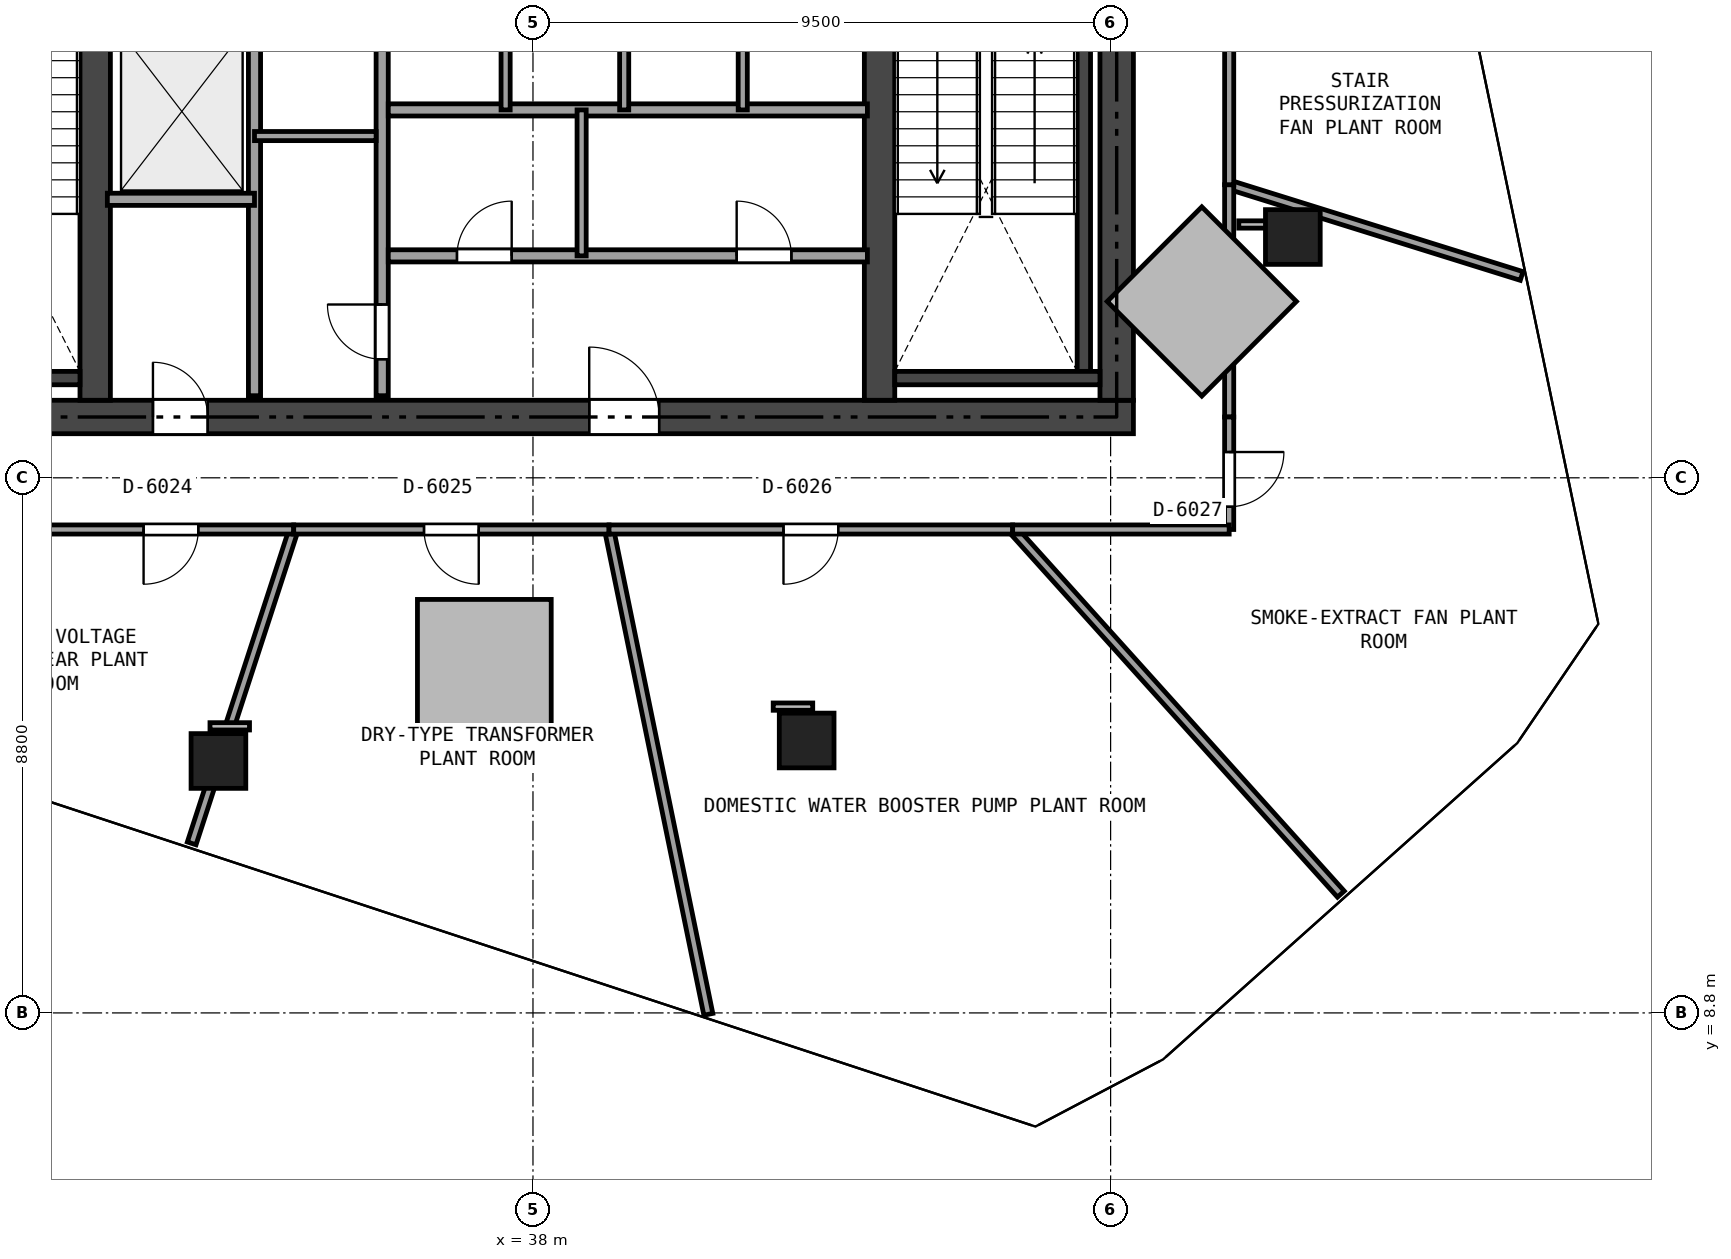
"""IFC4 building model, lengths in metres.
Left out: names, types, materials, properties, quantities, classifications, styles, units other than length and angle.
Written with IfcOpenShell. Run it as: python <this file> out.ifc"""

import sys

from ifc_helpers import new_model, si_unit, direction, frame, frame_2d, origin, origin_2d, place, context, subcontext, project, spatial, rectangle, extrude, element, fill, save


model = new_model("IFC4")
c1 = context("Model", 3, precision=1e-05, world=origin(), true_north=direction((0.0, 1.0)))
c2 = subcontext(c1, "Body", "Model", "MODEL_VIEW")
j1 = project(units=[si_unit("LENGTHUNIT", "METRE"), si_unit("PLANEANGLEUNIT", "RADIAN")], contexts=[c1])
p1 = place(None, origin())
s1 = spatial("IfcSite", under=j1, at=p1, CompositionType="ELEMENT")
p2 = place(p1, origin())
s2 = spatial("IfcBuilding", under=s1, at=p2, CompositionType="ELEMENT")
p3 = place(p2, frame((0.0, 0.0, 223.8)))
s3 = spatial("IfcBuildingStorey", under=s2, at=p3, CompositionType="ELEMENT", Elevation=223.8)
p4 = place(p3, frame((26.525, 18.6, 0.0), z_axis=(0.0, 0.0, 1.0), x_axis=(1.0, 0.0, 0.0)))
e1 = element("IfcWall", 1, at=p4, inside=s3, PredefinedType="SHEAR", context=c2, shape_type="SweptSolid", body=[
    extrude(rectangle(XDim=21.35, YDim=0.55, at=frame_2d((10.675, 0.0))), origin(), (0.0, 0.0, 1.0), 4.14),
])
p5 = place(p4, frame((12.4, 0.0, 0.0)))
e2 = element("IfcOpeningElement", 2, at=p5, cuts=e1, PredefinedType="OPENING", context=c2, shape_type="SweptSolid", body=[
    extrude(rectangle(XDim=1.15, YDim=2.15, at=frame_2d((0.575, 1.075))), frame((0.0, 0.285, 0.0), z_axis=(0.0, -1.0, 0.0), x_axis=(1.0, 0.0, 0.0)), (0.0, 0.0, 1.0), 0.57),
])
p6 = place(p4, frame((5.225, 0.0, 0.0)))
e3 = element("IfcOpeningElement", 3, at=p6, cuts=e1, PredefinedType="OPENING", context=c2, shape_type="SweptSolid", body=[
    extrude(rectangle(XDim=0.9, YDim=2.1, at=frame_2d((0.45, 1.05))), frame((0.0, 0.285, 0.0), z_axis=(0.0, -1.0, 0.0), x_axis=(1.0, 0.0, 0.0)), (0.0, 0.0, 1.0), 0.57),
])
p7 = place(p3, frame((47.6, 18.875, 0.0), z_axis=(0.0, 0.0, 1.0), x_axis=(0.0, 1.0, 0.0)))
e4 = element("IfcWall", 4, at=p7, inside=s3, PredefinedType="SHEAR", context=c2, shape_type="SweptSolid", body=[
    extrude(rectangle(XDim=15.05, YDim=0.55, at=frame_2d((7.525, 0.0))), origin(), (0.0, 0.0, 1.0), 4.14),
])
p8 = place(p7, frame((6.625, 0.0, 0.0)))
e5 = element("IfcOpeningElement", 5, at=p8, cuts=e4, PredefinedType="OPENING", context=c2, shape_type="SweptSolid", body=[
    extrude(rectangle(XDim=1.1, YDim=2.15, at=frame_2d((0.55, 1.075))), frame((0.0, 0.285, 0.0), z_axis=(0.0, -1.0, 0.0), x_axis=(1.0, 0.0, 0.0)), (0.0, 0.0, 1.0), 0.57),
])
p9 = place(p7, frame((8.525, 0.0, 0.0)))
e6 = element("IfcOpeningElement", 6, at=p9, cuts=e4, PredefinedType="OPENING", context=c2, shape_type="SweptSolid", body=[
    extrude(rectangle(XDim=0.9, YDim=2.1, at=frame_2d((0.45, 1.05))), frame((0.0, 0.285, 0.0), z_axis=(0.0, -1.0, 0.0), x_axis=(1.0, 0.0, 0.0)), (0.0, 0.0, 1.0), 0.57),
])
p10 = place(p7, frame((13.175, 0.0, 0.0)))
e7 = element("IfcOpeningElement", 7, at=p10, cuts=e4, PredefinedType="OPENING", context=c2, shape_type="SweptSolid", body=[
    extrude(rectangle(XDim=0.9, YDim=2.1, at=frame_2d((0.45, 1.05))), frame((0.0, 0.285, 0.0), z_axis=(0.0, -1.0, 0.0), x_axis=(1.0, 0.0, 0.0)), (0.0, 0.0, 1.0), 0.57),
])
p11 = place(p3, frame((30.8, 18.875, 0.0), z_axis=(0.0, 0.0, 1.0), x_axis=(0.0, 1.0, 0.0)))
e8 = element("IfcWall", 8, at=p11, inside=s3, PredefinedType="SHEAR", context=c2, shape_type="SweptSolid", body=[
    extrude(rectangle(XDim=15.05, YDim=0.5, at=frame_2d((7.525, 0.0))), origin(), (0.0, 0.0, 1.0), 4.14),
])
p12 = place(p11, frame((6.625, 0.0, 0.0)))
e9 = element("IfcOpeningElement", 9, at=p12, cuts=e8, PredefinedType="OPENING", context=c2, shape_type="SweptSolid", body=[
    extrude(rectangle(XDim=1.1, YDim=2.15, at=frame_2d((0.55, 1.075))), frame((0.0, 0.26, 0.0), z_axis=(0.0, -1.0, 0.0), x_axis=(1.0, 0.0, 0.0)), (0.0, 0.0, 1.0), 0.52),
])
p13 = place(p11, frame((8.425, 0.0, 0.0)))
e10 = element("IfcOpeningElement", 10, at=p13, cuts=e8, PredefinedType="OPENING", context=c2, shape_type="SweptSolid", body=[
    extrude(rectangle(XDim=0.9, YDim=2.1, at=frame_2d((0.45, 1.05))), frame((0.0, 0.26, 0.0), z_axis=(0.0, -1.0, 0.0), x_axis=(1.0, 0.0, 0.0)), (0.0, 0.0, 1.0), 0.52),
])
p14 = place(p3, frame((43.7, 18.875, 0.0), z_axis=(0.0, 0.0, 1.0), x_axis=(0.0, 1.0, 0.0)))
e11 = element("IfcWall", 11, at=p14, inside=s3, PredefinedType="SHEAR", context=c2, shape_type="SweptSolid", body=[
    extrude(rectangle(XDim=15.05, YDim=0.5, at=frame_2d((7.525, 0.0))), origin(), (0.0, 0.0, 1.0), 4.14),
])
p15 = place(p14, frame((8.125, 0.0, 0.0)))
e12 = element("IfcOpeningElement", 12, at=p15, cuts=e11, PredefinedType="OPENING", context=c2, shape_type="SweptSolid", body=[
    extrude(rectangle(XDim=0.9, YDim=2.1, at=frame_2d((0.45, 1.05))), frame((0.0, 0.26, 0.0), z_axis=(0.0, -1.0, 0.0), x_axis=(1.0, 0.0, 0.0)), (0.0, 0.0, 1.0), 0.52),
])
p16 = place(p3, frame((27.075, 19.24, 0.0), z_axis=(0.0, 0.0, 1.0), x_axis=(1.0, 0.0, 0.0)))
e13 = element("IfcWall", 13, at=p16, inside=s3, PredefinedType="SHEAR", context=c2, shape_type="SweptSolid", body=[
    extrude(rectangle(XDim=3.475, YDim=0.22, at=frame_2d((1.738, 0.0))), origin(), (0.0, 0.0, 1.0), 4.14),
])
p17 = place(p3, frame((47.06, 19.35, 0.0), z_axis=(0.0, 0.0, 1.0), x_axis=(0.0, 1.0, 0.0)))
e14 = element("IfcWall", 14, at=p17, inside=s3, PredefinedType="SHEAR", context=c2, shape_type="SweptSolid", body=[
    extrude(rectangle(XDim=5.9, YDim=0.22, at=frame_2d((2.95, 0.0))), origin(), (0.0, 0.0, 1.0), 4.14),
])
p18 = place(p3, frame((43.95, 19.24, 0.0), z_axis=(0.0, 0.0, 1.0), x_axis=(1.0, 0.0, 0.0)))
e15 = element("IfcWall", 15, at=p18, inside=s3, PredefinedType="SHEAR", context=c2, shape_type="SweptSolid", body=[
    extrude(rectangle(XDim=3.375, YDim=0.22, at=frame_2d((1.688, 0.0))), origin(), (0.0, 0.0, 1.0), 4.14),
])
for number, where, z_axis, x_axis in (
    (16, (32.827, 12.943, 0.0), (0.0, 0.0, 1.0), (1.0, 0.0, 0.0)),
    (17, (42.501, 13.28, 0.0), (0.0, 0.0, 1.0), (1.0, 0.0, 0.0)),
    (18, (50.497, 21.56, 0.0), (0.0, 0.0, 1.0), (1.0, 0.0, 0.0)),
):
    element("IfcColumn", number, at=place(p3, frame(where, z_axis=z_axis, x_axis=x_axis)), inside=s3, PredefinedType="COLUMN", context=c2, shape_type="SweptSolid", body=[
        extrude(rectangle(XDim=0.9, YDim=0.9, at=origin_2d()), origin(), (0.0, 0.0, 1.0), 4.14),
    ])
p19 = place(p3, frame((35.52, 18.95, 0.0), z_axis=(0.0, 0.0, 1.0), x_axis=(0.0, 1.0, 0.0)))
e19 = element("IfcWall", 19, at=p19, inside=s3, PredefinedType="SOLIDWALL", context=c2, shape_type="SweptSolid", body=[
    extrude(rectangle(XDim=14.9, YDim=0.2, at=frame_2d((7.45, 0.0))), origin(), (0.0, 0.0, 1.0), 3.661),
])
p20 = place(p19, frame((7.755, 0.0, 0.0)))
e20 = element("IfcOpeningElement", 20, at=p20, cuts=e19, PredefinedType="OPENING", context=c2, shape_type="SweptSolid", body=[
    extrude(rectangle(XDim=0.95, YDim=2.15, at=frame_2d((0.475, 1.075))), frame((0.0, 0.11, 0.0), z_axis=(0.0, -1.0, 0.0), x_axis=(1.0, 0.0, 0.0)), (0.0, 0.0, 1.0), 0.22),
])
p21 = place(p19, frame((0.6, 0.0, 0.0)))
e21 = element("IfcOpeningElement", 21, at=p21, cuts=e19, PredefinedType="OPENING", context=c2, shape_type="SweptSolid", body=[
    extrude(rectangle(XDim=0.9, YDim=2.1, at=frame_2d((0.45, 1.05))), frame((0.0, 0.11, 0.0), z_axis=(0.0, -1.0, 0.0), x_axis=(1.0, 0.0, 0.0)), (0.0, 0.0, 1.0), 0.22),
])
p22 = place(p3, frame((33.42, 18.95, 0.0), z_axis=(0.0, 0.0, 1.0), x_axis=(0.0, 1.0, 0.0)))
e22 = element("IfcWall", 22, at=p22, inside=s3, PredefinedType="SOLIDWALL", context=c2, shape_type="SweptSolid", body=[
    extrude(rectangle(XDim=6.13, YDim=0.2, at=frame_2d((3.065, 0.0))), origin(), (0.0, 0.0, 1.0), 3.661),
])
p23 = place(p3, frame((31.0, 22.18, 0.0), z_axis=(0.0, 0.0, 1.0), x_axis=(1.0, 0.0, 0.0)))
e23 = element("IfcWall", 23, at=p23, inside=s3, PredefinedType="SOLIDWALL", context=c2, shape_type="SweptSolid", body=[
    extrude(rectangle(XDim=2.42, YDim=0.2, at=frame_2d((1.21, 0.0))), origin(), (0.0, 0.0, 1.0), 4.14),
])
p24 = place(p3, frame((33.42, 23.22, 0.0), z_axis=(0.0, 0.0, 1.0), x_axis=(1.0, 0.0, 0.0)))
e24 = element("IfcWall", 24, at=p24, inside=s3, PredefinedType="PARTITIONING", context=c2, shape_type="SweptSolid", body=[
    extrude(rectangle(XDim=2.0, YDim=0.15, at=frame_2d((1.0, 0.0))), origin(), (0.0, 0.0, 1.0), 4.14),
])
p25 = place(p3, frame((35.62, 23.65, 0.0), z_axis=(0.0, 0.0, 1.0), x_axis=(1.0, 0.0, 0.0)))
e25 = element("IfcWall", 25, at=p25, inside=s3, PredefinedType="SOLIDWALL", context=c2, shape_type="SweptSolid", body=[
    extrude(rectangle(XDim=7.88, YDim=0.2, at=frame_2d((3.94, 0.0))), origin(), (0.0, 0.0, 1.0), 3.661),
])
p26 = place(p3, frame((35.62, 21.25, 0.0), z_axis=(0.0, 0.0, 1.0), x_axis=(1.0, 0.0, 0.0)))
e26 = element("IfcWall", 26, at=p26, inside=s3, PredefinedType="SOLIDWALL", context=c2, shape_type="SweptSolid", body=[
    extrude(rectangle(XDim=7.88, YDim=0.2, at=frame_2d((3.94, 0.0))), origin(), (0.0, 0.0, 1.0), 4.14),
])
p27 = place(p26, frame((1.13, 0.0, 0.0)))
e27 = element("IfcOpeningElement", 27, at=p27, cuts=e26, PredefinedType="OPENING", context=c2, shape_type="SweptSolid", body=[
    extrude(rectangle(XDim=0.9, YDim=2.1, at=frame_2d((0.45, 1.05))), frame((0.0, 0.11, 0.0), z_axis=(0.0, -1.0, 0.0), x_axis=(1.0, 0.0, 0.0)), (0.0, 0.0, 1.0), 0.22),
])
p28 = place(p26, frame((5.73, 0.0, 0.0)))
e28 = element("IfcOpeningElement", 28, at=p28, cuts=e26, PredefinedType="OPENING", context=c2, shape_type="SweptSolid", body=[
    extrude(rectangle(XDim=0.9, YDim=2.1, at=frame_2d((0.45, 1.05))), frame((0.0, 0.11, 0.0), z_axis=(0.0, -1.0, 0.0), x_axis=(1.0, 0.0, 0.0)), (0.0, 0.0, 1.0), 0.22),
])
for number, where, z_axis, x_axis in (
    (29, (37.55, 23.65, 0.0), (0.0, 0.0, 1.0), (0.0, 1.0, 0.0)),
    (30, (39.5, 23.65, 0.0), (0.0, 0.0, 1.0), (0.0, 1.0, 0.0)),
    (31, (41.45, 23.65, 0.0), (0.0, 0.0, 1.0), (0.0, 1.0, 0.0)),
):
    element("IfcWall", number, at=place(p3, frame(where, z_axis=z_axis, x_axis=x_axis)), inside=s3, PredefinedType="PARTITIONING", context=c2, shape_type="SweptSolid", body=[
        extrude(rectangle(XDim=2.55, YDim=0.15, at=frame_2d((1.275, 0.0))), origin(), (0.0, 0.0, 1.0), 3.661),
    ])
p29 = place(p3, frame((38.8, 21.25, 0.0), z_axis=(0.0, 0.0, 1.0), x_axis=(0.0, 1.0, 0.0)))
e32 = element("IfcWall", 32, at=p29, inside=s3, PredefinedType="PARTITIONING", context=c2, shape_type="SweptSolid", body=[
    extrude(rectangle(XDim=2.4, YDim=0.15, at=frame_2d((1.2, 0.0))), origin(), (0.0, 0.0, 1.0), 3.661),
])
p30 = place(p3, frame((32.387, 11.588, 0.0), z_axis=(0.0, 0.0, 1.0), x_axis=(0.309134889379, 0.951018201807, 0.0)))
e33 = element("IfcWall", 33, at=p30, inside=s3, PredefinedType="PARTITIONING", context=c2, shape_type="SweptSolid", body=[
    extrude(rectangle(XDim=5.428, YDim=0.15, at=frame_2d((2.714, 0.0))), origin(), (0.0, 0.0, 1.0), 3.125),
])
p31 = place(p3, frame((34.065, 16.75, 0.0), z_axis=(0.0, 0.0, 1.0), x_axis=(-1.0, 0.0, 0.0)))
e34 = element("IfcWall", 34, at=p31, inside=s3, PredefinedType="PARTITIONING", context=c2, shape_type="SweptSolid", body=[
    extrude(rectangle(XDim=7.582, YDim=0.15, at=frame_2d((3.791, 0.0))), origin(), (0.0, 0.0, 1.0), 3.125),
])
p32 = place(p31, frame((1.569, 0.0, 0.0)))
e35 = element("IfcOpeningElement", 35, at=p32, cuts=e34, PredefinedType="OPENING", context=c2, shape_type="SweptSolid", body=[
    extrude(rectangle(XDim=0.9, YDim=2.0, at=frame_2d((0.45, 1.0))), frame((0.0, 0.085, 0.0), z_axis=(0.0, -1.0, 0.0), x_axis=(1.0, 0.0, 0.0)), (0.0, 0.0, 1.0), 0.17),
])
p33 = place(p3, frame((40.884, 8.777, 0.0), z_axis=(0.0, 0.0, 1.0), x_axis=(-0.20065995391, 0.979660953033, 0.0)))
e36 = element("IfcWall", 36, at=p33, inside=s3, PredefinedType="PARTITIONING", context=c2, shape_type="SweptSolid", body=[
    extrude(rectangle(XDim=8.138, YDim=0.15, at=frame_2d((4.069, 0.0))), origin(), (0.0, 0.0, 1.0), 3.725),
])
p34 = place(p3, frame((39.251, 16.75, 0.0), z_axis=(0.0, 0.0, 1.0), x_axis=(-1.0, 0.0, 0.0)))
e37 = element("IfcWall", 37, at=p34, inside=s3, PredefinedType="PARTITIONING", context=c2, shape_type="SweptSolid", body=[
    extrude(rectangle(XDim=5.186, YDim=0.15, at=frame_2d((2.593, 0.0))), origin(), (0.0, 0.0, 1.0), 3.125),
])
p35 = place(p34, frame((2.143, 0.0, 0.0)))
e38 = element("IfcOpeningElement", 38, at=p35, cuts=e37, PredefinedType="OPENING", context=c2, shape_type="SweptSolid", body=[
    extrude(rectangle(XDim=0.9, YDim=2.0, at=frame_2d((0.45, 1.0))), frame((0.0, 0.085, 0.0), z_axis=(0.0, -1.0, 0.0), x_axis=(1.0, 0.0, 0.0)), (0.0, 0.0, 1.0), 0.17),
])
p36 = place(p3, frame((51.287, 10.754, 0.0), z_axis=(0.0, 0.0, 1.0), x_axis=(-0.669081751461, 0.743188811717, 0.0)))
e39 = element("IfcWall", 39, at=p36, inside=s3, PredefinedType="PARTITIONING", context=c2, shape_type="SweptSolid", body=[
    extrude(rectangle(XDim=8.068, YDim=0.15, at=frame_2d((4.034, 0.0))), origin(), (0.0, 0.0, 1.0), 3.725),
])
p37 = place(p3, frame((45.889, 16.75, 0.0), z_axis=(0.0, 0.0, 1.0), x_axis=(-1.0, 0.0, 0.0)))
e40 = element("IfcWall", 40, at=p37, inside=s3, PredefinedType="PARTITIONING", context=c2, shape_type="SweptSolid", body=[
    extrude(rectangle(XDim=6.638, YDim=0.15, at=frame_2d((3.319, 0.0))), origin(), (0.0, 0.0, 1.0), 3.125),
])
p38 = place(p37, frame((2.869, 0.0, 0.0)))
e41 = element("IfcOpeningElement", 41, at=p38, cuts=e40, PredefinedType="OPENING", context=c2, shape_type="SweptSolid", body=[
    extrude(rectangle(XDim=0.9, YDim=2.0, at=frame_2d((0.45, 1.0))), frame((0.0, 0.085, 0.0), z_axis=(0.0, -1.0, 0.0), x_axis=(1.0, 0.0, 0.0)), (0.0, 0.0, 1.0), 0.17),
])
p39 = place(p3, frame((54.26, 20.919, 0.0), z_axis=(0.0, 0.0, 1.0), x_axis=(-0.954602320973, 0.297883213346, 0.0)))
e42 = element("IfcWall", 42, at=p39, inside=s3, PredefinedType="PARTITIONING", context=c2, shape_type="SweptSolid", body=[
    extrude(rectangle(XDim=5.039, YDim=0.15, at=frame_2d((2.52, 0.0))), origin(), (0.0, 0.0, 1.0), 3.725),
])
p40 = place(p3, frame((49.45, 22.42, 0.0), z_axis=(0.0, 0.0, 1.0), x_axis=(0.0, -1.0, 0.0)))
e43 = element("IfcWall", 43, at=p40, inside=s3, PredefinedType="PARTITIONING", context=c2, shape_type="SweptSolid", body=[
    extrude(rectangle(XDim=3.82, YDim=0.15, at=frame_2d((1.91, 0.0))), origin(), (0.0, 0.0, 1.0), 3.125),
])
p41 = place(p3, frame((49.45, 18.6, 0.0), z_axis=(0.0, 0.0, 1.0), x_axis=(0.0, -1.0, 0.0)))
e44 = element("IfcWall", 44, at=p41, inside=s3, PredefinedType="PARTITIONING", context=c2, shape_type="SweptSolid", body=[
    extrude(rectangle(XDim=1.85, YDim=0.15, at=frame_2d((0.925, 0.0))), origin(), (0.0, 0.0, 1.0), 4.14),
])
p42 = place(p41, frame((0.576, 0.0, 0.0)))
e45 = element("IfcOpeningElement", 45, at=p42, cuts=e44, PredefinedType="OPENING", context=c2, shape_type="SweptSolid", body=[
    extrude(rectangle(XDim=0.9, YDim=2.0, at=frame_2d((0.45, 1.0))), frame((0.0, 0.085, 0.0), z_axis=(0.0, -1.0, 0.0), x_axis=(1.0, 0.0, 0.0)), (0.0, 0.0, 1.0), 0.17),
])
p43 = place(p3, frame((49.45, 16.75, 0.0), z_axis=(0.0, 0.0, 1.0), x_axis=(-1.0, 0.0, 0.0)))
e46 = element("IfcWall", 46, at=p43, inside=s3, PredefinedType="PARTITIONING", context=c2, shape_type="SweptSolid", body=[
    extrude(rectangle(XDim=3.561, YDim=0.15, at=frame_2d((1.781, 0.0))), origin(), (0.0, 0.0, 1.0), 3.725),
])
p44 = place(p3, frame((49.45, 29.004, 0.0), z_axis=(0.0, 0.0, 1.0), x_axis=(0.0, -1.0, 0.0)))
e47 = element("IfcWall", 47, at=p44, inside=s3, PredefinedType="PARTITIONING", context=c2, shape_type="SweptSolid", body=[
    extrude(rectangle(XDim=6.584, YDim=0.15, at=frame_2d((3.292, 0.0))), origin(), (0.0, 0.0, 1.0), 3.125),
])
p45 = place(p44, frame((2.842, 0.0, 0.0)))
e48 = element("IfcOpeningElement", 48, at=p45, cuts=e47, PredefinedType="OPENING", context=c2, shape_type="SweptSolid", body=[
    extrude(rectangle(XDim=0.9, YDim=2.0, at=frame_2d((0.45, 1.0))), frame((0.0, 0.085, 0.0), z_axis=(0.0, -1.0, 0.0), x_axis=(1.0, 0.0, 0.0)), (0.0, 0.0, 1.0), 0.17),
])
p46 = place(p5, origin())
e49 = element("IfcDoor", 49, at=p46, inside=s3, OperationType="SINGLE_SWING_LEFT", PredefinedType="DOOR", context=c2, shape_type="SweptSolid", body=[
    extrude(rectangle(XDim=1.15, YDim=2.15, at=frame_2d((0.575, 1.075))), frame((0.0, 0.025, 0.0), z_axis=(0.0, -1.0, 0.0), x_axis=(1.0, 0.0, 0.0)), (0.0, 0.0, 1.0), 0.05),
])
fill(e2, e49)
p47 = place(p6, origin())
e50 = element("IfcDoor", 50, at=p47, inside=s3, OperationType="SINGLE_SWING_LEFT", PredefinedType="DOOR", context=c2, shape_type="SweptSolid", body=[
    extrude(rectangle(XDim=0.9, YDim=2.1, at=frame_2d((0.45, 1.05))), frame((0.0, 0.025, 0.0), z_axis=(0.0, -1.0, 0.0), x_axis=(1.0, 0.0, 0.0)), (0.0, 0.0, 1.0), 0.05),
])
fill(e3, e50)
p48 = place(p21, origin())
e51 = element("IfcDoor", 51, at=p48, inside=s3, OperationType="SINGLE_SWING_RIGHT", PredefinedType="DOOR", context=c2, shape_type="SweptSolid", body=[
    extrude(rectangle(XDim=0.9, YDim=2.1, at=frame_2d((0.45, 1.05))), frame((0.0, 0.025, 0.0), z_axis=(0.0, -1.0, 0.0), x_axis=(1.0, 0.0, 0.0)), (0.0, 0.0, 1.0), 0.05),
])
fill(e21, e51)
p49 = place(p27, origin())
e52 = element("IfcDoor", 52, at=p49, inside=s3, OperationType="SINGLE_SWING_RIGHT", PredefinedType="DOOR", context=c2, shape_type="SweptSolid", body=[
    extrude(rectangle(XDim=0.9, YDim=2.1, at=frame_2d((0.45, 1.05))), frame((0.0, 0.025, 0.0), z_axis=(0.0, -1.0, 0.0), x_axis=(1.0, 0.0, 0.0)), (0.0, 0.0, 1.0), 0.05),
])
fill(e27, e52)
p50 = place(p28, origin())
e53 = element("IfcDoor", 53, at=p50, inside=s3, OperationType="SINGLE_SWING_LEFT", PredefinedType="DOOR", context=c2, shape_type="SweptSolid", body=[
    extrude(rectangle(XDim=0.9, YDim=2.1, at=frame_2d((0.45, 1.05))), frame((0.0, 0.025, 0.0), z_axis=(0.0, -1.0, 0.0), x_axis=(1.0, 0.0, 0.0)), (0.0, 0.0, 1.0), 0.05),
])
fill(e28, e53)
p51 = place(p32, origin())
e54 = element("IfcDoor", 54, at=p51, inside=s3, OperationType="SINGLE_SWING_RIGHT", PredefinedType="DOOR", context=c2, shape_type="SweptSolid", body=[
    extrude(rectangle(XDim=0.9, YDim=2.0, at=frame_2d((0.45, 1.0))), frame((0.0, 0.025, 0.0), z_axis=(0.0, -1.0, 0.0), x_axis=(1.0, 0.0, 0.0)), (0.0, 0.0, 1.0), 0.05),
])
fill(e35, e54)
p52 = place(p35, origin())
e55 = element("IfcDoor", 55, at=p52, inside=s3, OperationType="SINGLE_SWING_LEFT", PredefinedType="DOOR", context=c2, shape_type="SweptSolid", body=[
    extrude(rectangle(XDim=0.9, YDim=2.0, at=frame_2d((0.45, 1.0))), frame((0.0, 0.025, 0.0), z_axis=(0.0, -1.0, 0.0), x_axis=(1.0, 0.0, 0.0)), (0.0, 0.0, 1.0), 0.05),
])
fill(e38, e55)
p53 = place(p38, origin())
e56 = element("IfcDoor", 56, at=p53, inside=s3, OperationType="SINGLE_SWING_RIGHT", PredefinedType="DOOR", context=c2, shape_type="SweptSolid", body=[
    extrude(rectangle(XDim=0.9, YDim=2.0, at=frame_2d((0.45, 1.0))), frame((0.0, 0.025, 0.0), z_axis=(0.0, -1.0, 0.0), x_axis=(1.0, 0.0, 0.0)), (0.0, 0.0, 1.0), 0.05),
])
fill(e41, e56)
p54 = place(p42, origin())
e57 = element("IfcDoor", 57, at=p54, inside=s3, OperationType="SINGLE_SWING_LEFT", PredefinedType="DOOR", context=c2, shape_type="SweptSolid", body=[
    extrude(rectangle(XDim=0.9, YDim=2.0, at=frame_2d((0.45, 1.0))), frame((0.0, 0.025, 0.0), z_axis=(0.0, -1.0, 0.0), x_axis=(1.0, 0.0, 0.0)), (0.0, 0.0, 1.0), 0.05),
])
fill(e45, e57)
save(model, sys.argv[1])
